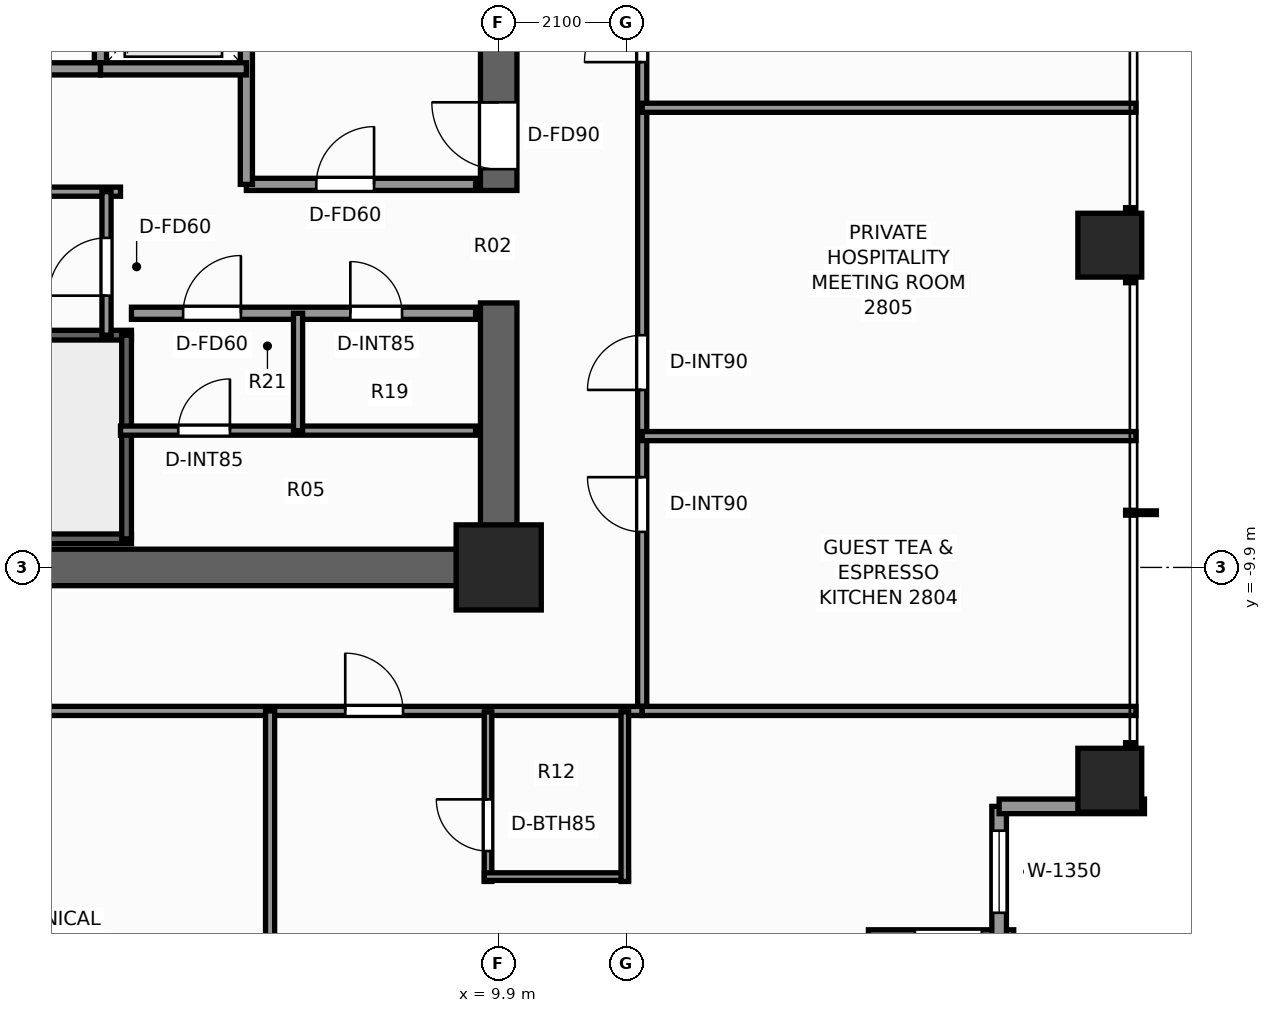
"""IFC4 building model, lengths in metres.
Left out: names, types, materials, properties, quantities, classifications, styles, units other than length and angle.
Written with IfcOpenShell. Run it as: python <this file> out.ifc"""

import sys

from ifc_helpers import new_model, si_unit, direction, frame, frame_2d, origin, origin_2d, place, context, subcontext, project, spatial, rectangle, extrude, element, fill, save


model = new_model("IFC4")
c1 = context("Model", 3, precision=1e-05, world=origin(), true_north=direction((0.0, 1.0)))
c2 = subcontext(c1, "Body", "Model", "MODEL_VIEW")
j1 = project(units=[si_unit("LENGTHUNIT", "METRE"), si_unit("PLANEANGLEUNIT", "RADIAN")], contexts=[c1])
p1 = place(None, origin())
s1 = spatial("IfcSite", under=j1, at=p1, CompositionType="ELEMENT")
p2 = place(p1, origin())
s2 = spatial("IfcBuilding", under=s1, at=p2, CompositionType="ELEMENT")
p3 = place(p2, frame((0.0, 0.0, 98.6)))
s3 = spatial("IfcBuildingStorey", under=s2, at=p3, CompositionType="ELEMENT", Elevation=98.6)
p4 = place(p3, frame((10.2, -9.9, 0.0), z_axis=(0.0, 0.0, 1.0), x_axis=(-1.0, 0.0, 0.0)))
e1 = element("IfcWall", 1, at=p4, inside=s3, PredefinedType="SHEAR", context=c2, shape_type="SweptSolid", body=[
    extrude(rectangle(XDim=12.06, YDim=0.6, at=frame_2d((6.03, 0.0))), origin(), (0.0, 0.0, 1.0), 3.3),
])
p5 = place(p3, frame((9.9, -9.6, 0.0), z_axis=(0.0, 0.0, 1.0), x_axis=(0.0, 1.0, 0.0)))
e2 = element("IfcWall", 2, at=p5, inside=s3, PredefinedType="SHEAR", context=c2, shape_type="SweptSolid", body=[
    extrude(rectangle(XDim=4.05, YDim=0.6, at=frame_2d((2.025, 0.0))), origin(), (0.0, 0.0, 1.0), 3.3),
])
p6 = place(p3, frame((9.9, -3.7, 0.0), z_axis=(0.0, 0.0, 1.0), x_axis=(0.0, 1.0, 0.0)))
e3 = element("IfcWall", 3, at=p6, inside=s3, PredefinedType="SHEAR", context=c2, shape_type="SweptSolid", body=[
    extrude(rectangle(XDim=13.3, YDim=0.6, at=frame_2d((6.65, 0.0))), origin(), (0.0, 0.0, 1.0), 3.3),
])
p7 = place(p6, frame((0.35, 0.0, 0.0)))
e4 = element("IfcOpeningElement", 4, at=p7, cuts=e3, PredefinedType="OPENING", context=c2, shape_type="SweptSolid", body=[
    extrude(rectangle(XDim=1.1, YDim=2.2, at=frame_2d((0.55, 1.1))), frame((0.0, 0.31, 0.0), z_axis=(0.0, -1.0, 0.0), x_axis=(1.0, 0.0, 0.0)), (0.0, 0.0, 1.0), 0.62),
])
p8 = place(p3, frame((9.9, -9.9, 0.0), z_axis=(0.0, 0.0, 1.0), x_axis=(1.0, 0.0, 0.0)))
e5 = element("IfcColumn", 5, at=p8, inside=s3, PredefinedType="COLUMN", context=c2, shape_type="SweptSolid", body=[
    extrude(rectangle(XDim=1.4, YDim=1.4, at=origin_2d()), origin(), (0.0, 0.0, 1.0), 3.3),
])
for number, where, z_axis, x_axis in (
    (6, (19.95, -13.4, 0.0), (0.0, 0.0, 1.0), (1.0, 0.0, 0.0)),
    (7, (19.95, -4.6, 0.0), (0.0, 0.0, 1.0), (1.0, 0.0, 0.0)),
):
    element("IfcColumn", number, at=place(p3, frame(where, z_axis=z_axis, x_axis=x_axis)), inside=s3, PredefinedType="COLUMN", context=c2, shape_type="SweptSolid", body=[
        extrude(rectangle(XDim=1.05, YDim=1.05, at=origin_2d()), origin(), (0.0, 0.0, 1.0), 3.3),
    ])
p9 = place(p3, frame((18.37, -15.98, 0.0), z_axis=(0.0, 0.0, 1.0), x_axis=(-1.0, 0.0, 0.0)))
e8 = element("IfcWall", 8, at=p9, inside=s3, PredefinedType="STANDARD", context=c2, shape_type="SweptSolid", body=[
    extrude(rectangle(XDim=2.39, YDim=0.24, at=frame_2d((1.195, 0.0))), origin(), (0.0, 0.0, 1.0), 2.459),
])
p10 = place(p9, frame((0.525, 0.0, 0.65)))
e9 = element("IfcOpeningElement", 9, at=p10, cuts=e8, PredefinedType="OPENING", context=c2, shape_type="SweptSolid", body=[
    extrude(rectangle(XDim=1.1, YDim=1.45, at=frame_2d((0.55, 0.725))), frame((0.0, 0.13, 0.0), z_axis=(0.0, -1.0, 0.0), x_axis=(1.0, 0.0, 0.0)), (0.0, 0.0, 1.0), 0.26),
])
p11 = place(p3, frame((18.13, -13.83, 0.0), z_axis=(0.0, 0.0, 1.0), x_axis=(0.0, -1.0, 0.0)))
e10 = element("IfcWall", 10, at=p11, inside=s3, PredefinedType="STANDARD", context=c2, shape_type="SweptSolid", body=[
    extrude(rectangle(XDim=2.39, YDim=0.24, at=frame_2d((1.195, 0.0))), origin(), (0.0, 0.0, 1.0), 2.459),
])
p12 = place(p11, frame((0.4, 0.0, 0.65)))
e11 = element("IfcOpeningElement", 11, at=p12, cuts=e10, PredefinedType="OPENING", context=c2, shape_type="SweptSolid", body=[
    extrude(rectangle(XDim=1.35, YDim=1.55, at=frame_2d((0.675, 0.775))), frame((0.0, 0.13, 0.0), z_axis=(0.0, -1.0, 0.0), x_axis=(1.0, 0.0, 0.0)), (0.0, 0.0, 1.0), 0.26),
])
p13 = place(p3, frame((20.52, -13.83, 0.0), z_axis=(0.0, 0.0, 1.0), x_axis=(-1.0, 0.0, 0.0)))
e12 = element("IfcWall", 12, at=p13, inside=s3, PredefinedType="STANDARD", context=c2, shape_type="SweptSolid", body=[
    extrude(rectangle(XDim=2.39, YDim=0.24, at=frame_2d((1.195, 0.0))), origin(), (0.0, 0.0, 1.0), 2.459),
])
p14 = place(p3, frame((3.86, -9.43, 0.0), z_axis=(0.0, 0.0, 1.0), x_axis=(-1.0, 0.0, 0.0)))
e13 = element("IfcWall", 13, at=p14, inside=s3, PredefinedType="SHEAR", context=c2, shape_type="SweptSolid", body=[
    extrude(rectangle(XDim=7.72, YDim=0.16, at=frame_2d((3.86, 0.0))), origin(), (0.0, 0.0, 1.0), 3.3),
])
p15 = place(p14, frame((6.01, 0.0, 0.0)))
e14 = element("IfcOpeningElement", 14, at=p15, cuts=e13, PredefinedType="OPENING", context=c2, shape_type="SweptSolid", body=[
    extrude(rectangle(XDim=1.1, YDim=2.2, at=frame_2d((0.55, 1.1))), frame((0.0, 0.09, 0.0), z_axis=(0.0, -1.0, 0.0), x_axis=(1.0, 0.0, 0.0)), (0.0, 0.0, 1.0), 0.18),
])
p16 = place(p3, frame((-3.86, -6.08, 0.0), z_axis=(0.0, 0.0, 1.0), x_axis=(1.0, 0.0, 0.0)))
e15 = element("IfcWall", 15, at=p16, inside=s3, PredefinedType="SHEAR", context=c2, shape_type="SweptSolid", body=[
    extrude(rectangle(XDim=7.72, YDim=0.16, at=frame_2d((3.86, 0.0))), origin(), (0.0, 0.0, 1.0), 3.3),
])
p17 = place(p3, frame((3.78, -9.43, 0.0), z_axis=(0.0, 0.0, 1.0), x_axis=(0.0, 1.0, 0.0)))
e16 = element("IfcWall", 16, at=p17, inside=s3, PredefinedType="SHEAR", context=c2, shape_type="SweptSolid", body=[
    extrude(rectangle(XDim=3.35, YDim=0.16, at=frame_2d((1.675, 0.0))), origin(), (0.0, 0.0, 1.0), 3.3),
])
p18 = place(p3, frame((5.75, -3.6, 0.0), z_axis=(0.0, 0.0, 1.0), x_axis=(1.0, 0.0, 0.0)))
e17 = element("IfcWall", 17, at=p18, inside=s3, PredefinedType="SOLIDWALL", context=c2, shape_type="SweptSolid", body=[
    extrude(rectangle(XDim=3.77, YDim=0.2, at=frame_2d((1.885, 0.0))), origin(), (0.0, 0.0, 1.0), 3.08),
])
p19 = place(p18, frame((1.15, 0.0, 0.0)))
e18 = element("IfcOpeningElement", 18, at=p19, cuts=e17, PredefinedType="OPENING", context=c2, shape_type="SweptSolid", body=[
    extrude(rectangle(XDim=0.95, YDim=2.06, at=frame_2d((0.475, 1.03))), frame((0.0, 0.11, 0.0), z_axis=(0.0, -1.0, 0.0), x_axis=(1.0, 0.0, 0.0)), (0.0, 0.0, 1.0), 0.22),
])
p20 = place(p3, frame((5.75, -3.6, 0.0), z_axis=(0.0, 0.0, 1.0), x_axis=(0.0, 1.0, 0.0)))
e19 = element("IfcWall", 19, at=p20, inside=s3, PredefinedType="SOLIDWALL", context=c2, shape_type="SweptSolid", body=[
    extrude(rectangle(XDim=5.57, YDim=0.2, at=frame_2d((2.785, 0.0))), origin(), (0.0, 0.0, 1.0), 3.08),
])
p21 = place(p20, frame((2.75, 0.0, 0.0)))
e20 = element("IfcOpeningElement", 20, at=p21, cuts=e19, PredefinedType="OPENING", context=c2, shape_type="SweptSolid", body=[
    extrude(rectangle(XDim=1.1, YDim=2.2, at=frame_2d((0.55, 1.1))), frame((0.0, 0.11, 0.0), z_axis=(0.0, -1.0, 0.0), x_axis=(1.0, 0.0, 0.0)), (0.0, 0.0, 1.0), 0.22),
])
p22 = place(p3, frame((3.35, -1.7, 0.0), z_axis=(0.0, 0.0, 1.0), x_axis=(0.0, 1.0, 0.0)))
e21 = element("IfcWall", 21, at=p22, inside=s3, PredefinedType="SOLIDWALL", context=c2, shape_type="SweptSolid", body=[
    extrude(rectangle(XDim=2.8, YDim=0.2, at=frame_2d((1.4, 0.0))), origin(), (0.0, 0.0, 1.0), 3.08),
])
p23 = place(p3, frame((3.35, -1.7, 0.0), z_axis=(0.0, 0.0, 1.0), x_axis=(1.0, 0.0, 0.0)))
e22 = element("IfcWall", 22, at=p23, inside=s3, PredefinedType="SOLIDWALL", context=c2, shape_type="SweptSolid", body=[
    extrude(rectangle(XDim=2.4, YDim=0.2, at=frame_2d((1.2, 0.0))), origin(), (0.0, 0.0, 1.0), 3.08),
])
p24 = place(p3, frame((3.86, -5.72, 0.0), z_axis=(0.0, 0.0, 1.0), x_axis=(1.0, 0.0, 0.0)))
e23 = element("IfcWall", 23, at=p24, inside=s3, PredefinedType="SOLIDWALL", context=c2, shape_type="SweptSolid", body=[
    extrude(rectangle(XDim=5.66, YDim=0.2, at=frame_2d((2.83, 0.0))), origin(), (0.0, 0.0, 1.0), 3.08),
])
p25 = place(p24, frame((0.85, 0.0, 0.0)))
e24 = element("IfcOpeningElement", 24, at=p25, cuts=e23, PredefinedType="OPENING", context=c2, shape_type="SweptSolid", body=[
    extrude(rectangle(XDim=0.95, YDim=2.06, at=frame_2d((0.475, 1.03))), frame((0.0, 0.11, 0.0), z_axis=(0.0, -1.0, 0.0), x_axis=(1.0, 0.0, 0.0)), (0.0, 0.0, 1.0), 0.22),
])
p26 = place(p24, frame((3.6, 0.0, 0.0)))
e25 = element("IfcOpeningElement", 25, at=p26, cuts=e23, PredefinedType="OPENING", context=c2, shape_type="SweptSolid", body=[
    extrude(rectangle(XDim=0.85, YDim=2.03, at=frame_2d((0.425, 1.015))), frame((0.0, 0.11, 0.0), z_axis=(0.0, -1.0, 0.0), x_axis=(1.0, 0.0, 0.0)), (0.0, 0.0, 1.0), 0.22),
])
p27 = place(p3, frame((3.68, -7.65, 0.0), z_axis=(0.0, 0.0, 1.0), x_axis=(1.0, 0.0, 0.0)))
e26 = element("IfcWall", 26, at=p27, inside=s3, PredefinedType="PARTITIONING", context=c2, shape_type="SweptSolid", body=[
    extrude(rectangle(XDim=5.84, YDim=0.15, at=frame_2d((2.92, 0.0))), origin(), (0.0, 0.0, 1.0), 3.08),
])
p28 = place(p27, frame((0.95, 0.0, 0.0)))
e27 = element("IfcOpeningElement", 27, at=p28, cuts=e26, PredefinedType="OPENING", context=c2, shape_type="SweptSolid", body=[
    extrude(rectangle(XDim=0.85, YDim=2.03, at=frame_2d((0.425, 1.015))), frame((0.0, 0.085, 0.0), z_axis=(0.0, -1.0, 0.0), x_axis=(1.0, 0.0, 0.0)), (0.0, 0.0, 1.0), 0.17),
])
p29 = place(p3, frame((6.6, -7.65, 0.0), z_axis=(0.0, 0.0, 1.0), x_axis=(0.0, 1.0, 0.0)))
e28 = element("IfcWall", 28, at=p29, inside=s3, PredefinedType="PARTITIONING", context=c2, shape_type="SweptSolid", body=[
    extrude(rectangle(XDim=1.93, YDim=0.15, at=frame_2d((0.965, 0.0))), origin(), (0.0, 0.0, 1.0), 3.08),
])
p30 = place(p3, frame((-3.35, -1.7, 0.0), z_axis=(0.0, 0.0, 1.0), x_axis=(1.0, 0.0, 0.0)))
e29 = element("IfcWall", 29, at=p30, inside=s3, PredefinedType="SOLIDWALL", context=c2, shape_type="SweptSolid", body=[
    extrude(rectangle(XDim=6.7, YDim=0.2, at=frame_2d((3.35, 0.0))), origin(), (0.0, 0.0, 1.0), 3.08),
])
p31 = place(p3, frame((-3.68, -3.72, 0.0), z_axis=(0.0, 0.0, 1.0), x_axis=(1.0, 0.0, 0.0)))
e30 = element("IfcWall", 30, at=p31, inside=s3, PredefinedType="PARTITIONING", context=c2, shape_type="SweptSolid", body=[
    extrude(rectangle(XDim=7.36, YDim=0.15, at=frame_2d((3.68, 0.0))), origin(), (0.0, 0.0, 1.0), 3.08),
])
p32 = place(p3, frame((3.45, -6.08, 0.0), z_axis=(0.0, 0.0, 1.0), x_axis=(0.0, 1.0, 0.0)))
e31 = element("IfcWall", 31, at=p32, inside=s3, PredefinedType="PARTITIONING", context=c2, shape_type="SweptSolid", body=[
    extrude(rectangle(XDim=2.36, YDim=0.15, at=frame_2d((1.18, 0.0))), origin(), (0.0, 0.0, 1.0), 3.08),
])
p33 = place(p32, frame((0.65, 0.0, 0.0)))
e32 = element("IfcOpeningElement", 32, at=p33, cuts=e31, PredefinedType="OPENING", context=c2, shape_type="SweptSolid", body=[
    extrude(rectangle(XDim=0.95, YDim=2.06, at=frame_2d((0.475, 1.03))), frame((0.0, 0.085, 0.0), z_axis=(0.0, -1.0, 0.0), x_axis=(1.0, 0.0, 0.0)), (0.0, 0.0, 1.0), 0.17),
])
p34 = place(p3, frame((12.26, -12.26, 0.0), z_axis=(0.0, 0.0, 1.0), x_axis=(0.0, 1.0, 0.0)))
e33 = element("IfcWall", 33, at=p34, inside=s3, PredefinedType="PARTITIONING", context=c2, shape_type="SweptSolid", body=[
    extrude(rectangle(XDim=24.84, YDim=0.15, at=frame_2d((12.42, 0.0))), origin(), (0.0, 0.0, 1.0), 2.292),
])
p35 = place(p34, frame((2.944, 0.0, 0.0)))
e34 = element("IfcOpeningElement", 34, at=p35, cuts=e33, PredefinedType="OPENING", context=c2, shape_type="SweptSolid", body=[
    extrude(rectangle(XDim=0.9, YDim=2.06, at=frame_2d((0.45, 1.03))), frame((0.0, 0.085, 0.0), z_axis=(0.0, -1.0, 0.0), x_axis=(1.0, 0.0, 0.0)), (0.0, 0.0, 1.0), 0.17),
])
p36 = place(p34, frame((5.279, 0.0, 0.0)))
e35 = element("IfcOpeningElement", 35, at=p36, cuts=e33, PredefinedType="OPENING", context=c2, shape_type="SweptSolid", body=[
    extrude(rectangle(XDim=0.9, YDim=2.06, at=frame_2d((0.45, 1.03))), frame((0.0, 0.085, 0.0), z_axis=(0.0, -1.0, 0.0), x_axis=(1.0, 0.0, 0.0)), (0.0, 0.0, 1.0), 0.17),
])
p37 = place(p34, frame((10.671, 0.0, 0.0)))
e36 = element("IfcOpeningElement", 36, at=p37, cuts=e33, PredefinedType="OPENING", context=c2, shape_type="SweptSolid", body=[
    extrude(rectangle(XDim=0.95, YDim=2.06, at=frame_2d((0.475, 1.03))), frame((0.0, 0.085, 0.0), z_axis=(0.0, -1.0, 0.0), x_axis=(1.0, 0.0, 0.0)), (0.0, 0.0, 1.0), 0.17),
])
p38 = place(p34, frame((18.186, 0.0, 0.0)))
e37 = element("IfcOpeningElement", 37, at=p38, cuts=e33, PredefinedType="OPENING", context=c2, shape_type="SweptSolid", body=[
    extrude(rectangle(XDim=0.95, YDim=2.06, at=frame_2d((0.475, 1.03))), frame((0.0, 0.085, 0.0), z_axis=(0.0, -1.0, 0.0), x_axis=(1.0, 0.0, 0.0)), (0.0, 0.0, 1.0), 0.17),
])
p39 = place(p34, frame((20.259, 0.0, 0.0)))
e38 = element("IfcOpeningElement", 38, at=p39, cuts=e33, PredefinedType="OPENING", context=c2, shape_type="SweptSolid", body=[
    extrude(rectangle(XDim=0.95, YDim=2.06, at=frame_2d((0.475, 1.03))), frame((0.0, 0.085, 0.0), z_axis=(0.0, -1.0, 0.0), x_axis=(1.0, 0.0, 0.0)), (0.0, 0.0, 1.0), 0.17),
])
p40 = place(p3, frame((-3.65, -12.26, 0.0), z_axis=(0.0, 0.0, 1.0), x_axis=(1.0, 0.0, 0.0)))
e39 = element("IfcWall", 39, at=p40, inside=s3, PredefinedType="PARTITIONING", context=c2, shape_type="SweptSolid", body=[
    extrude(rectangle(XDim=15.91, YDim=0.15, at=frame_2d((7.955, 0.0))), origin(), (0.0, 0.0, 1.0), 2.292),
])
p41 = place(p40, frame((5.205, 0.0, 0.0)))
e40 = element("IfcOpeningElement", 40, at=p41, cuts=e39, PredefinedType="OPENING", context=c2, shape_type="SweptSolid", body=[
    extrude(rectangle(XDim=0.95, YDim=2.06, at=frame_2d((0.475, 1.03))), frame((0.0, 0.085, 0.0), z_axis=(0.0, -1.0, 0.0), x_axis=(1.0, 0.0, 0.0)), (0.0, 0.0, 1.0), 0.17),
])
p42 = place(p40, frame((11.026, 0.0, 0.0)))
e41 = element("IfcOpeningElement", 41, at=p42, cuts=e39, PredefinedType="OPENING", context=c2, shape_type="SweptSolid", body=[
    extrude(rectangle(XDim=0.95, YDim=2.06, at=frame_2d((0.475, 1.03))), frame((0.0, 0.085, 0.0), z_axis=(0.0, -1.0, 0.0), x_axis=(1.0, 0.0, 0.0)), (0.0, 0.0, 1.0), 0.17),
])
p43 = place(p3, frame((12.26, -12.26, 0.0), z_axis=(0.0, 0.0, 1.0), x_axis=(1.0, 0.0, 0.0)))
e42 = element("IfcWall", 42, at=p43, inside=s3, PredefinedType="PARTITIONING", context=c2, shape_type="SweptSolid", body=[
    extrude(rectangle(XDim=8.12, YDim=0.15, at=frame_2d((4.06, 0.0))), origin(), (0.0, 0.0, 1.0), 2.292),
])
for number, where, z_axis, x_axis in (
    (43, (12.26, -7.74, 0.0), (0.0, 0.0, 1.0), (1.0, 0.0, 0.0)),
    (44, (12.26, -2.34, 0.0), (0.0, 0.0, 1.0), (1.0, 0.0, 0.0)),
):
    element("IfcWall", number, at=place(p3, frame(where, z_axis=z_axis, x_axis=x_axis)), inside=s3, PredefinedType="PARTITIONING", context=c2, shape_type="SweptSolid", body=[
        extrude(rectangle(XDim=8.12, YDim=0.15, at=frame_2d((4.06, 0.0))), origin(), (0.0, 0.0, 1.0), 2.449),
    ])
p44 = place(p3, frame((6.14, -20.38, 0.0), z_axis=(0.0, 0.0, 1.0), x_axis=(0.0, 1.0, 0.0)))
e45 = element("IfcWall", 45, at=p44, inside=s3, PredefinedType="PARTITIONING", context=c2, shape_type="SweptSolid", body=[
    extrude(rectangle(XDim=8.12, YDim=0.15, at=frame_2d((4.06, 0.0))), origin(), (0.0, 0.0, 1.0), 2.369),
])
p45 = place(p3, frame((9.724, -15.065, 0.0), z_axis=(0.0, 0.0, 1.0), x_axis=(0.0, 1.0, 0.0)))
e46 = element("IfcWall", 46, at=p45, inside=s3, PredefinedType="PARTITIONING", context=c2, shape_type="SweptSolid", body=[
    extrude(rectangle(XDim=2.79, YDim=0.125, at=frame_2d((1.395, 0.0))), origin(), (0.0, 0.0, 1.0), 3.08),
])
p46 = place(p45, frame((0.5, 0.0, 0.0)))
e47 = element("IfcOpeningElement", 47, at=p46, cuts=e46, PredefinedType="OPENING", context=c2, shape_type="SweptSolid", body=[
    extrude(rectangle(XDim=0.85, YDim=2.03, at=frame_2d((0.425, 1.015))), frame((0.0, 0.073, 0.0), z_axis=(0.0, -1.0, 0.0), x_axis=(1.0, 0.0, 0.0)), (0.0, 0.0, 1.0), 0.145),
])
p47 = place(p3, frame((9.664, -14.985, 0.0), z_axis=(0.0, 0.0, 1.0), x_axis=(1.0, 0.0, 0.0)))
e48 = element("IfcWall", 48, at=p47, inside=s3, PredefinedType="PARTITIONING", context=c2, shape_type="SweptSolid", body=[
    extrude(rectangle(XDim=2.37, YDim=0.125, at=frame_2d((1.185, 0.0))), origin(), (0.0, 0.0, 1.0), 2.292),
])
p48 = place(p3, frame((11.974, -15.065, 0.0), z_axis=(0.0, 0.0, 1.0), x_axis=(0.0, 1.0, 0.0)))
e49 = element("IfcWall", 49, at=p48, inside=s3, PredefinedType="PARTITIONING", context=c2, shape_type="SweptSolid", body=[
    extrude(rectangle(XDim=2.79, YDim=0.125, at=frame_2d((1.395, 0.0))), origin(), (0.0, 0.0, 1.0), 3.08),
])
p49 = place(p12, origin())
e50 = element("IfcWindow", 50, at=p49, inside=s3, PartitioningType="SINGLE_PANEL", PredefinedType="WINDOW", context=c2, shape_type="SweptSolid", body=[
    extrude(rectangle(XDim=1.35, YDim=1.55, at=frame_2d((0.675, 0.775))), frame((0.0, 0.03, 0.0), z_axis=(0.0, -1.0, 0.0), x_axis=(1.0, 0.0, 0.0)), (0.0, 0.0, 1.0), 0.06),
])
fill(e11, e50)
p50 = place(p7, origin())
e51 = element("IfcDoor", 51, at=p50, inside=s3, OperationType="SINGLE_SWING_RIGHT", PredefinedType="DOOR", context=c2, shape_type="SweptSolid", body=[
    extrude(rectangle(XDim=1.1, YDim=2.2, at=frame_2d((0.55, 1.1))), frame((0.0, 0.025, 0.0), z_axis=(0.0, -1.0, 0.0), x_axis=(1.0, 0.0, 0.0)), (0.0, 0.0, 1.0), 0.05),
])
fill(e4, e51)
p51 = place(p25, origin())
e52 = element("IfcDoor", 52, at=p51, inside=s3, OperationType="SINGLE_SWING_RIGHT", PredefinedType="DOOR", context=c2, shape_type="SweptSolid", body=[
    extrude(rectangle(XDim=0.95, YDim=2.06, at=frame_2d((0.475, 1.03))), frame((0.0, 0.025, 0.0), z_axis=(0.0, -1.0, 0.0), x_axis=(1.0, 0.0, 0.0)), (0.0, 0.0, 1.0), 0.05),
])
fill(e24, e52)
p52 = place(p26, origin())
e53 = element("IfcDoor", 53, at=p52, inside=s3, OperationType="SINGLE_SWING_LEFT", PredefinedType="DOOR", context=c2, shape_type="SweptSolid", body=[
    extrude(rectangle(XDim=0.85, YDim=2.03, at=frame_2d((0.425, 1.015))), frame((0.0, 0.025, 0.0), z_axis=(0.0, -1.0, 0.0), x_axis=(1.0, 0.0, 0.0)), (0.0, 0.0, 1.0), 0.05),
])
fill(e25, e53)
p53 = place(p28, origin())
e54 = element("IfcDoor", 54, at=p53, inside=s3, OperationType="SINGLE_SWING_RIGHT", PredefinedType="DOOR", context=c2, shape_type="SweptSolid", body=[
    extrude(rectangle(XDim=0.85, YDim=2.03, at=frame_2d((0.425, 1.015))), frame((0.0, 0.025, 0.0), z_axis=(0.0, -1.0, 0.0), x_axis=(1.0, 0.0, 0.0)), (0.0, 0.0, 1.0), 0.05),
])
fill(e27, e54)
p54 = place(p19, origin())
e55 = element("IfcDoor", 55, at=p54, inside=s3, OperationType="SINGLE_SWING_RIGHT", PredefinedType="DOOR", context=c2, shape_type="SweptSolid", body=[
    extrude(rectangle(XDim=0.95, YDim=2.06, at=frame_2d((0.475, 1.03))), frame((0.0, 0.025, 0.0), z_axis=(0.0, -1.0, 0.0), x_axis=(1.0, 0.0, 0.0)), (0.0, 0.0, 1.0), 0.05),
])
fill(e18, e55)
p55 = place(p33, origin())
e56 = element("IfcDoor", 56, at=p55, inside=s3, OperationType="SINGLE_SWING_LEFT", PredefinedType="DOOR", context=c2, shape_type="SweptSolid", body=[
    extrude(rectangle(XDim=0.95, YDim=2.06, at=frame_2d((0.475, 1.03))), frame((0.0, 0.025, 0.0), z_axis=(0.0, -1.0, 0.0), x_axis=(1.0, 0.0, 0.0)), (0.0, 0.0, 1.0), 0.05),
])
fill(e32, e56)
p56 = place(p35, origin())
e57 = element("IfcDoor", 57, at=p56, inside=s3, OperationType="SINGLE_SWING_RIGHT", PredefinedType="DOOR", context=c2, shape_type="SweptSolid", body=[
    extrude(rectangle(XDim=0.9, YDim=2.06, at=frame_2d((0.45, 1.03))), frame((0.0, 0.025, 0.0), z_axis=(0.0, -1.0, 0.0), x_axis=(1.0, 0.0, 0.0)), (0.0, 0.0, 1.0), 0.05),
])
fill(e34, e57)
p57 = place(p36, origin())
e58 = element("IfcDoor", 58, at=p57, inside=s3, OperationType="SINGLE_SWING_LEFT", PredefinedType="DOOR", context=c2, shape_type="SweptSolid", body=[
    extrude(rectangle(XDim=0.9, YDim=2.06, at=frame_2d((0.45, 1.03))), frame((0.0, 0.025, 0.0), z_axis=(0.0, -1.0, 0.0), x_axis=(1.0, 0.0, 0.0)), (0.0, 0.0, 1.0), 0.05),
])
fill(e35, e58)
p58 = place(p37, origin())
e59 = element("IfcDoor", 59, at=p58, inside=s3, OperationType="SINGLE_SWING_LEFT", PredefinedType="DOOR", context=c2, shape_type="SweptSolid", body=[
    extrude(rectangle(XDim=0.95, YDim=2.06, at=frame_2d((0.475, 1.03))), frame((0.0, 0.025, 0.0), z_axis=(0.0, -1.0, 0.0), x_axis=(1.0, 0.0, 0.0)), (0.0, 0.0, 1.0), 0.05),
])
fill(e36, e59)
p59 = place(p46, origin())
e60 = element("IfcDoor", 60, at=p59, inside=s3, OperationType="SINGLE_SWING_RIGHT", PredefinedType="DOOR", context=c2, shape_type="SweptSolid", body=[
    extrude(rectangle(XDim=0.85, YDim=2.03, at=frame_2d((0.425, 1.015))), frame((0.0, 0.025, 0.0), z_axis=(0.0, -1.0, 0.0), x_axis=(1.0, 0.0, 0.0)), (0.0, 0.0, 1.0), 0.05),
])
fill(e47, e60)
p60 = place(p42, origin())
e61 = element("IfcDoor", 61, at=p60, inside=s3, OperationType="SINGLE_SWING_LEFT", PredefinedType="DOOR", context=c2, shape_type="SweptSolid", body=[
    extrude(rectangle(XDim=0.95, YDim=2.06, at=frame_2d((0.475, 1.03))), frame((0.0, 0.025, 0.0), z_axis=(0.0, -1.0, 0.0), x_axis=(1.0, 0.0, 0.0)), (0.0, 0.0, 1.0), 0.05),
])
fill(e41, e61)
save(model, sys.argv[1])
